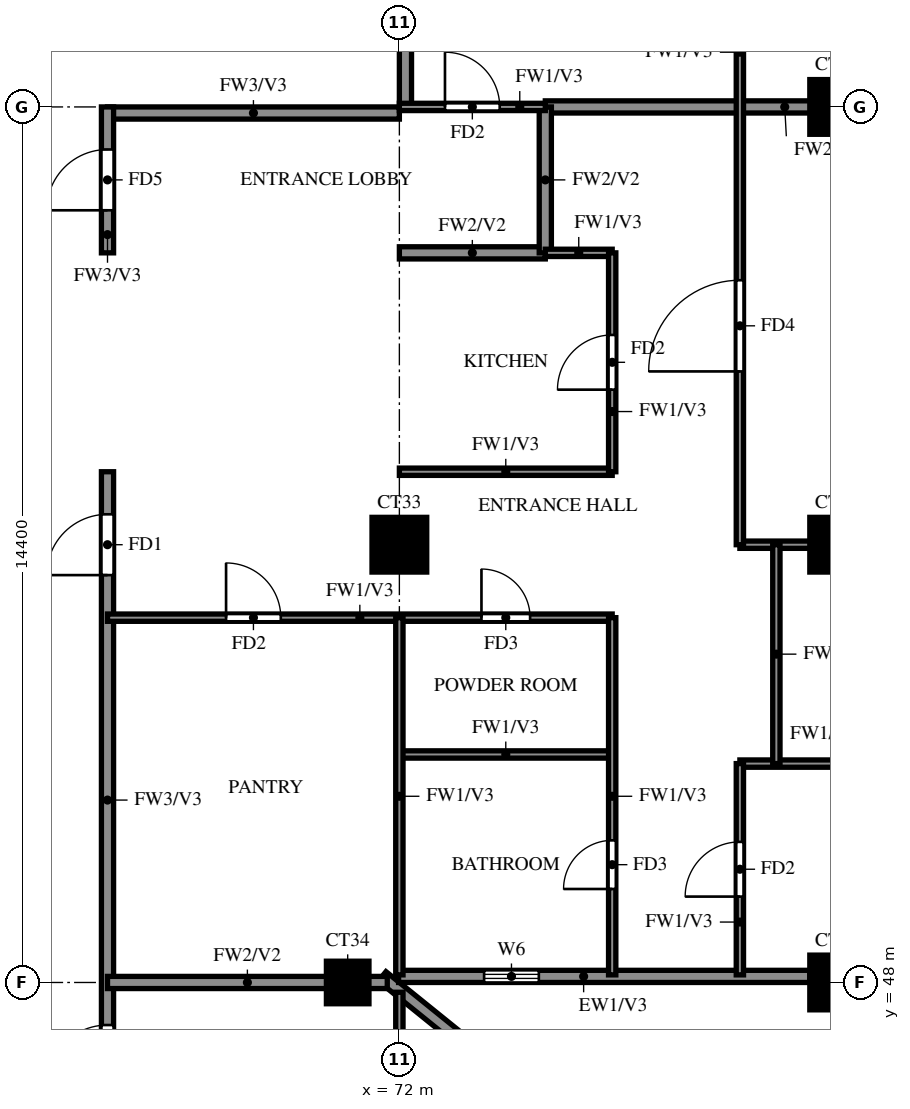
"""IFC4 building model, lengths in metres.
Left out: names, types, materials, properties, quantities, classifications, styles, units other than length and angle.
Written with IfcOpenShell. Run it as: python <this file> out.ifc"""

import sys

from ifc_helpers import new_model, si_unit, direction, frame, frame_2d, origin, origin_2d, place, context, subcontext, project, spatial, rectangle, extrude, source, transform, mapped, element, fill, save


model = new_model("IFC4")
c1 = context("Model", 3, precision=1e-05, world=origin(), true_north=direction((0.0, 1.0)))
c2 = subcontext(c1, "Body", "Model", "MODEL_VIEW")
j1 = project(units=[si_unit("LENGTHUNIT", "METRE"), si_unit("PLANEANGLEUNIT", "RADIAN")], contexts=[c1])
p1 = place(None, origin())
s1 = spatial("IfcSite", under=j1, at=p1, CompositionType="ELEMENT")
p2 = place(p1, origin())
s2 = spatial("IfcBuilding", under=s1, at=p2, CompositionType="ELEMENT")
p3 = place(p2, frame((0.0, 0.0, 222.0)))
s3 = spatial("IfcBuildingStorey", under=s2, at=p3, CompositionType="ELEMENT", Elevation=222.0)
m1 = source(origin(), c2, "Body", "SweptSolid", [
    extrude(rectangle(XDim=0.7, YDim=0.7, at=origin_2d()), origin(), (0.0, 0.0, 1.0), 3.22),
])
p4 = place(p3, frame((71.15, 48.0, 0.0), z_axis=(0.0, 0.0, 1.0), x_axis=(1.0, 0.0, 0.0)))
e1 = element("IfcColumn", 1, at=p4, inside=s3, PredefinedType="COLUMN", context=c2, shape_type="MappedRepresentation", body=[
    mapped(m1, transform((0.0, 0.0, 0.0))),
])
m2 = source(origin(), c2, "Body", "SweptSolid", [
    extrude(rectangle(XDim=0.9, YDim=0.9, at=origin_2d()), origin(), (0.0, 0.0, 1.0), 3.22),
])
for number, where, z_axis, x_axis in (
    (2, (79.2, 48.0, 0.0), (0.0, 0.0, 1.0), (1.0, 0.0, 0.0)),
    (3, (72.0, 55.2, 0.0), (0.0, 0.0, 1.0), (1.0, 0.0, 0.0)),
    (4, (79.2, 55.2, 0.0), (0.0, 0.0, 1.0), (1.0, 0.0, 0.0)),
    (5, (79.2, 62.4, 0.0), (0.0, 0.0, 1.0), (1.0, 0.0, 0.0)),
):
    element("IfcColumn", number, at=place(p3, frame(where, z_axis=z_axis, x_axis=x_axis)), inside=s3, PredefinedType="COLUMN", context=c2, shape_type="MappedRepresentation", body=[
        mapped(m2, transform((0.0, 0.0, 0.0))),
    ])
p5 = place(p3, frame((81.907, 39.87, 0.0), z_axis=(0.0, 0.0, 1.0), x_axis=(-0.777936274417, 0.62834318087, 0.0)))
e6 = element("IfcWall", 6, at=p5, inside=s3, PredefinedType="SOLIDWALL", context=c2, shape_type="SweptSolid", body=[
    extrude(rectangle(XDim=13.099, YDim=0.2, at=frame_2d((6.549, 0.0))), origin(), (0.0, 0.0, 1.0), 3.22),
])
p6 = place(p5, frame((9.938, 0.0, 1.5)))
e7 = element("IfcOpeningElement", 7, at=p6, cuts=e6, PredefinedType="OPENING", context=c2, shape_type="SweptSolid", body=[
    extrude(rectangle(XDim=0.9, YDim=0.9, at=frame_2d((0.45, 0.45))), frame((0.0, 0.11, 0.0), z_axis=(0.0, -1.0, 0.0), x_axis=(1.0, 0.0, 0.0)), (0.0, 0.0, 1.0), 0.22),
])
p7 = place(p3, frame((71.987, 48.1, 0.0), z_axis=(0.0, 0.0, 1.0), x_axis=(1.0, 0.0, 0.0)))
e8 = element("IfcWall", 8, at=p7, inside=s3, PredefinedType="SOLIDWALL", context=c2, shape_type="SweptSolid", body=[
    extrude(rectangle(XDim=6.763, YDim=0.2, at=frame_2d((3.381, 0.0))), origin(), (0.0, 0.0, 1.0), 3.22),
])
p8 = place(p7, frame((1.406, 0.0, 1.5)))
e9 = element("IfcOpeningElement", 9, at=p8, cuts=e8, PredefinedType="OPENING", context=c2, shape_type="SweptSolid", body=[
    extrude(rectangle(XDim=0.9, YDim=0.9, at=frame_2d((0.45, 0.45))), frame((0.0, 0.11, 0.0), z_axis=(0.0, -1.0, 0.0), x_axis=(1.0, 0.0, 0.0)), (0.0, 0.0, 1.0), 0.22),
])
p9 = place(p3, frame((67.2, 62.3, 0.0), z_axis=(0.0, 0.0, 1.0), x_axis=(1.0, 0.0, 0.0)))
e10 = element("IfcWall", 10, at=p9, inside=s3, PredefinedType="SOLIDWALL", context=c2, shape_type="SweptSolid", body=[
    extrude(rectangle(XDim=4.8, YDim=0.2, at=frame_2d((2.4, 0.0))), origin(), (0.0, 0.0, 1.0), 3.22),
])
p10 = place(p3, frame((67.2, 45.6, 0.0), z_axis=(0.0, 0.0, 1.0), x_axis=(0.0, 1.0, 0.0)))
e11 = element("IfcWall", 11, at=p10, inside=s3, PredefinedType="SOLIDWALL", context=c2, shape_type="SweptSolid", body=[
    extrude(rectangle(XDim=10.8, YDim=0.2, at=frame_2d((5.4, 0.0))), origin(), (0.0, 0.0, 1.0), 3.22),
])
p11 = place(p10, frame((9.1, 0.0, 0.0)))
e12 = element("IfcOpeningElement", 12, at=p11, cuts=e11, PredefinedType="OPENING", context=c2, shape_type="SweptSolid", body=[
    extrude(rectangle(XDim=1.0, YDim=2.1, at=frame_2d((0.5, 1.05))), frame((0.0, 0.11, 0.0), z_axis=(0.0, -1.0, 0.0), x_axis=(1.0, 0.0, 0.0)), (0.0, 0.0, 1.0), 0.22),
])
p12 = place(p10, frame((0.7, 0.0, 0.0)))
e13 = element("IfcOpeningElement", 13, at=p12, cuts=e11, PredefinedType="OPENING", context=c2, shape_type="SweptSolid", body=[
    extrude(rectangle(XDim=1.0, YDim=2.1, at=frame_2d((0.5, 1.05))), frame((0.0, 0.11, 0.0), z_axis=(0.0, -1.0, 0.0), x_axis=(1.0, 0.0, 0.0)), (0.0, 0.0, 1.0), 0.22),
])
p13 = place(p3, frame((67.2, 60.0, 0.0), z_axis=(0.0, 0.0, 1.0), x_axis=(0.0, 1.0, 0.0)))
e14 = element("IfcWall", 14, at=p13, inside=s3, PredefinedType="SOLIDWALL", context=c2, shape_type="SweptSolid", body=[
    extrude(rectangle(XDim=2.4, YDim=0.2, at=frame_2d((1.2, 0.0))), origin(), (0.0, 0.0, 1.0), 3.22),
])
p14 = place(p13, frame((0.7, 0.0, 0.0)))
e15 = element("IfcOpeningElement", 15, at=p14, cuts=e14, PredefinedType="OPENING", context=c2, shape_type="SweptSolid", body=[
    extrude(rectangle(XDim=1.0, YDim=2.1, at=frame_2d((0.5, 1.05))), frame((0.0, 0.11, 0.0), z_axis=(0.0, -1.0, 0.0), x_axis=(1.0, 0.0, 0.0)), (0.0, 0.0, 1.0), 0.22),
])
p15 = place(p3, frame((72.1, 62.4, 0.0), z_axis=(0.0, 0.0, 1.0), x_axis=(0.0, 1.0, 0.0)))
e16 = element("IfcWall", 16, at=p15, inside=s3, PredefinedType="SOLIDWALL", context=c2, shape_type="SweptSolid", body=[
    extrude(rectangle(XDim=15.6, YDim=0.2, at=frame_2d((7.8, 0.0))), origin(), (0.0, 0.0, 1.0), 3.22),
])
p16 = place(p3, frame((67.2, 48.0, 0.0), z_axis=(0.0, 0.0, 1.0), x_axis=(1.0, 0.0, 0.0)))
e17 = element("IfcWall", 17, at=p16, inside=s3, PredefinedType="SOLIDWALL", context=c2, shape_type="SweptSolid", body=[
    extrude(rectangle(XDim=4.601, YDim=0.2, at=frame_2d((2.301, 0.0))), origin(), (0.0, 0.0, 1.0), 3.22),
])
p17 = place(p3, frame((72.0, 60.0, 0.0), z_axis=(0.0, 0.0, 1.0), x_axis=(1.0, 0.0, 0.0)))
e18 = element("IfcWall", 18, at=p17, inside=s3, PredefinedType="SOLIDWALL", context=c2, shape_type="SweptSolid", body=[
    extrude(rectangle(XDim=2.4, YDim=0.2, at=frame_2d((1.2, 0.0))), origin(), (0.0, 0.0, 1.0), 3.22),
])
p18 = place(p3, frame((74.4, 62.4, 0.0), z_axis=(0.0, 0.0, 1.0), x_axis=(1.0, 0.0, 0.0)))
e19 = element("IfcWall", 19, at=p18, inside=s3, PredefinedType="SOLIDWALL", context=c2, shape_type="SweptSolid", body=[
    extrude(rectangle(XDim=7.875, YDim=0.2, at=frame_2d((3.938, 0.0))), origin(), (0.0, 0.0, 1.0), 3.22),
])
p19 = place(p3, frame((74.4, 60.0, 0.0), z_axis=(0.0, 0.0, 1.0), x_axis=(0.0, 1.0, 0.0)))
e20 = element("IfcWall", 20, at=p19, inside=s3, PredefinedType="SOLIDWALL", context=c2, shape_type="SweptSolid", body=[
    extrude(rectangle(XDim=2.4, YDim=0.2, at=frame_2d((1.2, 0.0))), origin(), (0.0, 0.0, 1.0), 3.22),
])
p20 = place(p3, frame((77.6, 51.6, 0.0), z_axis=(0.0, 0.0, 1.0), x_axis=(1.0, 0.0, 0.0)))
e21 = element("IfcWall", 21, at=p20, inside=s3, PredefinedType="PARTITIONING", context=c2, shape_type="SweptSolid", body=[
    extrude(rectangle(XDim=4.675, YDim=0.12, at=frame_2d((2.337, 0.0))), origin(), (0.0, 0.0, 1.0), 2.32),
])
p21 = place(p20, frame((2.238, 0.0, 0.0)))
e22 = element("IfcOpeningElement", 22, at=p21, cuts=e21, PredefinedType="OPENING", context=c2, shape_type="SweptSolid", body=[
    extrude(rectangle(XDim=0.8, YDim=2.1, at=frame_2d((0.4, 1.05))), frame((0.0, 0.07, 0.0), z_axis=(0.0, -1.0, 0.0), x_axis=(1.0, 0.0, 0.0)), (0.0, 0.0, 1.0), 0.14),
])
p22 = place(p3, frame((72.0, 51.75, 0.0), z_axis=(0.0, 0.0, 1.0), x_axis=(1.0, 0.0, 0.0)))
e23 = element("IfcWall", 23, at=p22, inside=s3, PredefinedType="PARTITIONING", context=c2, shape_type="SweptSolid", body=[
    extrude(rectangle(XDim=3.5, YDim=0.12, at=frame_2d((1.75, 0.0))), origin(), (0.0, 0.0, 1.0), 3.22),
])
p23 = place(p3, frame((67.2, 54.0, 0.0), z_axis=(0.0, 0.0, 1.0), x_axis=(1.0, 0.0, 0.0)))
e24 = element("IfcWall", 24, at=p23, inside=s3, PredefinedType="PARTITIONING", context=c2, shape_type="SweptSolid", body=[
    extrude(rectangle(XDim=8.3, YDim=0.12, at=frame_2d((4.15, 0.0))), origin(), (0.0, 0.0, 1.0), 3.22),
])
p24 = place(p23, frame((6.15, 0.0, 0.0)))
e25 = element("IfcOpeningElement", 25, at=p24, cuts=e24, PredefinedType="OPENING", context=c2, shape_type="SweptSolid", body=[
    extrude(rectangle(XDim=0.8, YDim=2.1, at=frame_2d((0.4, 1.05))), frame((0.0, 0.07, 0.0), z_axis=(0.0, -1.0, 0.0), x_axis=(1.0, 0.0, 0.0)), (0.0, 0.0, 1.0), 0.14),
])
p25 = place(p23, frame((1.95, 0.0, 0.0)))
e26 = element("IfcOpeningElement", 26, at=p25, cuts=e24, PredefinedType="OPENING", context=c2, shape_type="SweptSolid", body=[
    extrude(rectangle(XDim=0.9, YDim=2.1, at=frame_2d((0.45, 1.05))), frame((0.0, 0.07, 0.0), z_axis=(0.0, -1.0, 0.0), x_axis=(1.0, 0.0, 0.0)), (0.0, 0.0, 1.0), 0.14),
])
p26 = place(p3, frame((77.6, 55.2, 0.0), z_axis=(0.0, 0.0, 1.0), x_axis=(1.0, 0.0, 0.0)))
e27 = element("IfcWall", 27, at=p26, inside=s3, PredefinedType="PARTITIONING", context=c2, shape_type="SweptSolid", body=[
    extrude(rectangle(XDim=4.675, YDim=0.12, at=frame_2d((2.337, 0.0))), origin(), (0.0, 0.0, 1.0), 3.22),
])
p27 = place(p3, frame((72.0, 56.4, 0.0), z_axis=(0.0, 0.0, 1.0), x_axis=(1.0, 0.0, 0.0)))
e28 = element("IfcWall", 28, at=p27, inside=s3, PredefinedType="PARTITIONING", context=c2, shape_type="SweptSolid", body=[
    extrude(rectangle(XDim=3.5, YDim=0.12, at=frame_2d((1.75, 0.0))), origin(), (0.0, 0.0, 1.0), 3.22),
])
p28 = place(p3, frame((74.4, 60.0, 0.0), z_axis=(0.0, 0.0, 1.0), x_axis=(1.0, 0.0, 0.0)))
e29 = element("IfcWall", 29, at=p28, inside=s3, PredefinedType="PARTITIONING", context=c2, shape_type="SweptSolid", body=[
    extrude(rectangle(XDim=1.1, YDim=0.12, at=frame_2d((0.55, 0.0))), origin(), (0.0, 0.0, 1.0), 3.22),
])
p29 = place(p3, frame((72.0, 62.4, 0.0), z_axis=(0.0, 0.0, 1.0), x_axis=(1.0, 0.0, 0.0)))
e30 = element("IfcWall", 30, at=p29, inside=s3, PredefinedType="PARTITIONING", context=c2, shape_type="SweptSolid", body=[
    extrude(rectangle(XDim=2.4, YDim=0.12, at=frame_2d((1.2, 0.0))), origin(), (0.0, 0.0, 1.0), 3.22),
])
p30 = place(p29, frame((0.75, 0.0, 0.0)))
e31 = element("IfcOpeningElement", 31, at=p30, cuts=e30, PredefinedType="OPENING", context=c2, shape_type="SweptSolid", body=[
    extrude(rectangle(XDim=0.9, YDim=2.1, at=frame_2d((0.45, 1.05))), frame((0.0, 0.07, 0.0), z_axis=(0.0, -1.0, 0.0), x_axis=(1.0, 0.0, 0.0)), (0.0, 0.0, 1.0), 0.14),
])
p31 = place(p3, frame((72.0, 39.725, 0.0), z_axis=(0.0, 0.0, 1.0), x_axis=(0.0, 1.0, 0.0)))
e32 = element("IfcWall", 32, at=p31, inside=s3, PredefinedType="PARTITIONING", context=c2, shape_type="SweptSolid", body=[
    extrude(rectangle(XDim=8.114, YDim=0.12, at=frame_2d((4.057, 0.0))), origin(), (0.0, 0.0, 1.0), 2.32),
])
p32 = place(p31, frame((1.788, 0.0, 0.0)))
e33 = element("IfcOpeningElement", 33, at=p32, cuts=e32, PredefinedType="OPENING", context=c2, shape_type="SweptSolid", body=[
    extrude(rectangle(XDim=0.9, YDim=2.1, at=frame_2d((0.45, 1.05))), frame((0.0, 0.07, 0.0), z_axis=(0.0, -1.0, 0.0), x_axis=(1.0, 0.0, 0.0)), (0.0, 0.0, 1.0), 0.14),
])
p33 = place(p31, frame((4.575, 0.0, 0.0)))
e34 = element("IfcOpeningElement", 34, at=p33, cuts=e32, PredefinedType="OPENING", context=c2, shape_type="SweptSolid", body=[
    extrude(rectangle(XDim=0.8, YDim=2.1, at=frame_2d((0.4, 1.05))), frame((0.0, 0.07, 0.0), z_axis=(0.0, -1.0, 0.0), x_axis=(1.0, 0.0, 0.0)), (0.0, 0.0, 1.0), 0.14),
])
p34 = place(p3, frame((72.0, 48.125, 0.0), z_axis=(0.0, 0.0, 1.0), x_axis=(0.0, 1.0, 0.0)))
e35 = element("IfcWall", 35, at=p34, inside=s3, PredefinedType="PARTITIONING", context=c2, shape_type="SweptSolid", body=[
    extrude(rectangle(XDim=5.875, YDim=0.12, at=frame_2d((2.938, 0.0))), origin(), (0.0, 0.0, 1.0), 3.22),
])
p35 = place(p3, frame((75.5, 48.125, 0.0), z_axis=(0.0, 0.0, 1.0), x_axis=(0.0, 1.0, 0.0)))
e36 = element("IfcWall", 36, at=p35, inside=s3, PredefinedType="PARTITIONING", context=c2, shape_type="SweptSolid", body=[
    extrude(rectangle(XDim=5.875, YDim=0.12, at=frame_2d((2.938, 0.0))), origin(), (0.0, 0.0, 1.0), 3.22),
])
p36 = place(p35, frame((1.413, 0.0, 0.0)))
e37 = element("IfcOpeningElement", 37, at=p36, cuts=e36, PredefinedType="OPENING", context=c2, shape_type="SweptSolid", body=[
    extrude(rectangle(XDim=0.8, YDim=2.1, at=frame_2d((0.4, 1.05))), frame((0.0, 0.07, 0.0), z_axis=(0.0, -1.0, 0.0), x_axis=(1.0, 0.0, 0.0)), (0.0, 0.0, 1.0), 0.14),
])
p37 = place(p3, frame((75.5, 56.4, 0.0), z_axis=(0.0, 0.0, 1.0), x_axis=(0.0, 1.0, 0.0)))
e38 = element("IfcWall", 38, at=p37, inside=s3, PredefinedType="PARTITIONING", context=c2, shape_type="SweptSolid", body=[
    extrude(rectangle(XDim=3.6, YDim=0.12, at=frame_2d((1.8, 0.0))), origin(), (0.0, 0.0, 1.0), 3.22),
])
p38 = place(p37, frame((1.35, 0.0, 0.0)))
e39 = element("IfcOpeningElement", 39, at=p38, cuts=e38, PredefinedType="OPENING", context=c2, shape_type="SweptSolid", body=[
    extrude(rectangle(XDim=0.9, YDim=2.1, at=frame_2d((0.45, 1.05))), frame((0.0, 0.07, 0.0), z_axis=(0.0, -1.0, 0.0), x_axis=(1.0, 0.0, 0.0)), (0.0, 0.0, 1.0), 0.14),
])
p39 = place(p3, frame((77.6, 48.125, 0.0), z_axis=(0.0, 0.0, 1.0), x_axis=(0.0, 1.0, 0.0)))
e40 = element("IfcWall", 40, at=p39, inside=s3, PredefinedType="PARTITIONING", context=c2, shape_type="SweptSolid", body=[
    extrude(rectangle(XDim=3.475, YDim=0.12, at=frame_2d((1.738, 0.0))), origin(), (0.0, 0.0, 1.0), 3.22),
])
p40 = place(p39, frame((1.288, 0.0, 0.0)))
e41 = element("IfcOpeningElement", 41, at=p40, cuts=e40, PredefinedType="OPENING", context=c2, shape_type="SweptSolid", body=[
    extrude(rectangle(XDim=0.9, YDim=2.1, at=frame_2d((0.45, 1.05))), frame((0.0, 0.07, 0.0), z_axis=(0.0, -1.0, 0.0), x_axis=(1.0, 0.0, 0.0)), (0.0, 0.0, 1.0), 0.14),
])
p41 = place(p3, frame((77.6, 55.2, 0.0), z_axis=(0.0, 0.0, 1.0), x_axis=(0.0, 1.0, 0.0)))
e42 = element("IfcWall", 42, at=p41, inside=s3, PredefinedType="PARTITIONING", context=c2, shape_type="SweptSolid", body=[
    extrude(rectangle(XDim=18.0, YDim=0.12, at=frame_2d((9.0, 0.0))), origin(), (0.0, 0.0, 1.0), 3.22),
])
p42 = place(p41, frame((2.85, 0.0, 0.0)))
e43 = element("IfcOpeningElement", 43, at=p42, cuts=e42, PredefinedType="OPENING", context=c2, shape_type="SweptSolid", body=[
    extrude(rectangle(XDim=1.5, YDim=2.1, at=frame_2d((0.75, 1.05))), frame((0.0, 0.07, 0.0), z_axis=(0.0, -1.0, 0.0), x_axis=(1.0, 0.0, 0.0)), (0.0, 0.0, 1.0), 0.14),
])
p43 = place(p41, frame((8.55, 0.0, 0.0)))
e44 = element("IfcOpeningElement", 44, at=p43, cuts=e42, PredefinedType="OPENING", context=c2, shape_type="SweptSolid", body=[
    extrude(rectangle(XDim=0.9, YDim=2.1, at=frame_2d((0.45, 1.05))), frame((0.0, 0.07, 0.0), z_axis=(0.0, -1.0, 0.0), x_axis=(1.0, 0.0, 0.0)), (0.0, 0.0, 1.0), 0.14),
])
p44 = place(p41, frame((12.15, 0.0, 0.0)))
e45 = element("IfcOpeningElement", 45, at=p44, cuts=e42, PredefinedType="OPENING", context=c2, shape_type="SweptSolid", body=[
    extrude(rectangle(XDim=0.9, YDim=2.1, at=frame_2d((0.45, 1.05))), frame((0.0, 0.07, 0.0), z_axis=(0.0, -1.0, 0.0), x_axis=(1.0, 0.0, 0.0)), (0.0, 0.0, 1.0), 0.14),
])
p45 = place(p41, frame((15.75, 0.0, 0.0)))
e46 = element("IfcOpeningElement", 46, at=p45, cuts=e42, PredefinedType="OPENING", context=c2, shape_type="SweptSolid", body=[
    extrude(rectangle(XDim=0.9, YDim=2.1, at=frame_2d((0.45, 1.05))), frame((0.0, 0.07, 0.0), z_axis=(0.0, -1.0, 0.0), x_axis=(1.0, 0.0, 0.0)), (0.0, 0.0, 1.0), 0.14),
])
p46 = place(p3, frame((78.2, 51.6, 0.0), z_axis=(0.0, 0.0, 1.0), x_axis=(0.0, 1.0, 0.0)))
e47 = element("IfcWall", 47, at=p46, inside=s3, PredefinedType="PARTITIONING", context=c2, shape_type="SweptSolid", body=[
    extrude(rectangle(XDim=3.6, YDim=0.12, at=frame_2d((1.8, 0.0))), origin(), (0.0, 0.0, 1.0), 3.22),
])
p47 = place(p8, origin())
e48 = element("IfcWindow", 48, at=p47, inside=s3, PartitioningType="SINGLE_PANEL", PredefinedType="WINDOW", context=c2, shape_type="SweptSolid", body=[
    extrude(rectangle(XDim=0.9, YDim=0.9, at=frame_2d((0.45, 0.45))), frame((0.0, 0.03, 0.0), z_axis=(0.0, -1.0, 0.0), x_axis=(1.0, 0.0, 0.0)), (0.0, 0.0, 1.0), 0.06),
])
fill(e9, e48)
p48 = place(p11, origin())
e49 = element("IfcDoor", 49, at=p48, inside=s3, OperationType="SINGLE_SWING_LEFT", PredefinedType="DOOR", context=c2, shape_type="SweptSolid", body=[
    extrude(rectangle(XDim=1.0, YDim=2.1, at=frame_2d((0.5, 1.05))), frame((0.0, 0.025, 0.0), z_axis=(0.0, -1.0, 0.0), x_axis=(1.0, 0.0, 0.0)), (0.0, 0.0, 1.0), 0.05),
])
fill(e12, e49)
p49 = place(p40, origin())
e50 = element("IfcDoor", 50, at=p49, inside=s3, OperationType="SINGLE_SWING_RIGHT", PredefinedType="DOOR", context=c2, shape_type="SweptSolid", body=[
    extrude(rectangle(XDim=0.9, YDim=2.1, at=frame_2d((0.45, 1.05))), frame((0.0, 0.025, 0.0), z_axis=(0.0, -1.0, 0.0), x_axis=(1.0, 0.0, 0.0)), (0.0, 0.0, 1.0), 0.05),
])
fill(e41, e50)
p50 = place(p42, origin())
e51 = element("IfcDoor", 51, at=p50, inside=s3, OperationType="SINGLE_SWING_LEFT", PredefinedType="DOOR", context=c2, shape_type="SweptSolid", body=[
    extrude(rectangle(XDim=1.5, YDim=2.1, at=frame_2d((0.75, 1.05))), frame((0.0, 0.025, 0.0), z_axis=(0.0, -1.0, 0.0), x_axis=(1.0, 0.0, 0.0)), (0.0, 0.0, 1.0), 0.05),
])
fill(e43, e51)
p51 = place(p36, origin())
e52 = element("IfcDoor", 52, at=p51, inside=s3, OperationType="SINGLE_SWING_RIGHT", PredefinedType="DOOR", context=c2, shape_type="SweptSolid", body=[
    extrude(rectangle(XDim=0.8, YDim=2.1, at=frame_2d((0.4, 1.05))), frame((0.0, 0.025, 0.0), z_axis=(0.0, -1.0, 0.0), x_axis=(1.0, 0.0, 0.0)), (0.0, 0.0, 1.0), 0.05),
])
fill(e37, e52)
p52 = place(p24, origin())
e53 = element("IfcDoor", 53, at=p52, inside=s3, OperationType="SINGLE_SWING_LEFT", PredefinedType="DOOR", context=c2, shape_type="SweptSolid", body=[
    extrude(rectangle(XDim=0.8, YDim=2.1, at=frame_2d((0.4, 1.05))), frame((0.0, 0.025, 0.0), z_axis=(0.0, -1.0, 0.0), x_axis=(1.0, 0.0, 0.0)), (0.0, 0.0, 1.0), 0.05),
])
fill(e25, e53)
p53 = place(p38, origin())
e54 = element("IfcDoor", 54, at=p53, inside=s3, OperationType="SINGLE_SWING_LEFT", PredefinedType="DOOR", context=c2, shape_type="SweptSolid", body=[
    extrude(rectangle(XDim=0.9, YDim=2.1, at=frame_2d((0.45, 1.05))), frame((0.0, 0.025, 0.0), z_axis=(0.0, -1.0, 0.0), x_axis=(1.0, 0.0, 0.0)), (0.0, 0.0, 1.0), 0.05),
])
fill(e39, e54)
p54 = place(p25, origin())
e55 = element("IfcDoor", 55, at=p54, inside=s3, OperationType="SINGLE_SWING_RIGHT", PredefinedType="DOOR", context=c2, shape_type="SweptSolid", body=[
    extrude(rectangle(XDim=0.9, YDim=2.1, at=frame_2d((0.45, 1.05))), frame((0.0, 0.025, 0.0), z_axis=(0.0, -1.0, 0.0), x_axis=(1.0, 0.0, 0.0)), (0.0, 0.0, 1.0), 0.05),
])
fill(e26, e55)
p55 = place(p30, origin())
e56 = element("IfcDoor", 56, at=p55, inside=s3, OperationType="SINGLE_SWING_RIGHT", PredefinedType="DOOR", context=c2, shape_type="SweptSolid", body=[
    extrude(rectangle(XDim=0.9, YDim=2.1, at=frame_2d((0.45, 1.05))), frame((0.0, 0.025, 0.0), z_axis=(0.0, -1.0, 0.0), x_axis=(1.0, 0.0, 0.0)), (0.0, 0.0, 1.0), 0.05),
])
fill(e31, e56)
p56 = place(p14, origin())
e57 = element("IfcDoor", 57, at=p56, inside=s3, OperationType="SINGLE_SWING_LEFT", PredefinedType="DOOR", context=c2, shape_type="SweptSolid", body=[
    extrude(rectangle(XDim=1.0, YDim=2.1, at=frame_2d((0.5, 1.05))), frame((0.0, 0.025, 0.0), z_axis=(0.0, -1.0, 0.0), x_axis=(1.0, 0.0, 0.0)), (0.0, 0.0, 1.0), 0.05),
])
fill(e15, e57)
p57 = place(p12, origin())
e58 = element("IfcDoor", 58, at=p57, inside=s3, OperationType="SINGLE_SWING_LEFT", PredefinedType="DOOR", context=c2, shape_type="SweptSolid", body=[
    extrude(rectangle(XDim=1.0, YDim=2.1, at=frame_2d((0.5, 1.05))), frame((0.0, 0.025, 0.0), z_axis=(0.0, -1.0, 0.0), x_axis=(1.0, 0.0, 0.0)), (0.0, 0.0, 1.0), 0.05),
])
fill(e13, e58)
save(model, sys.argv[1])
